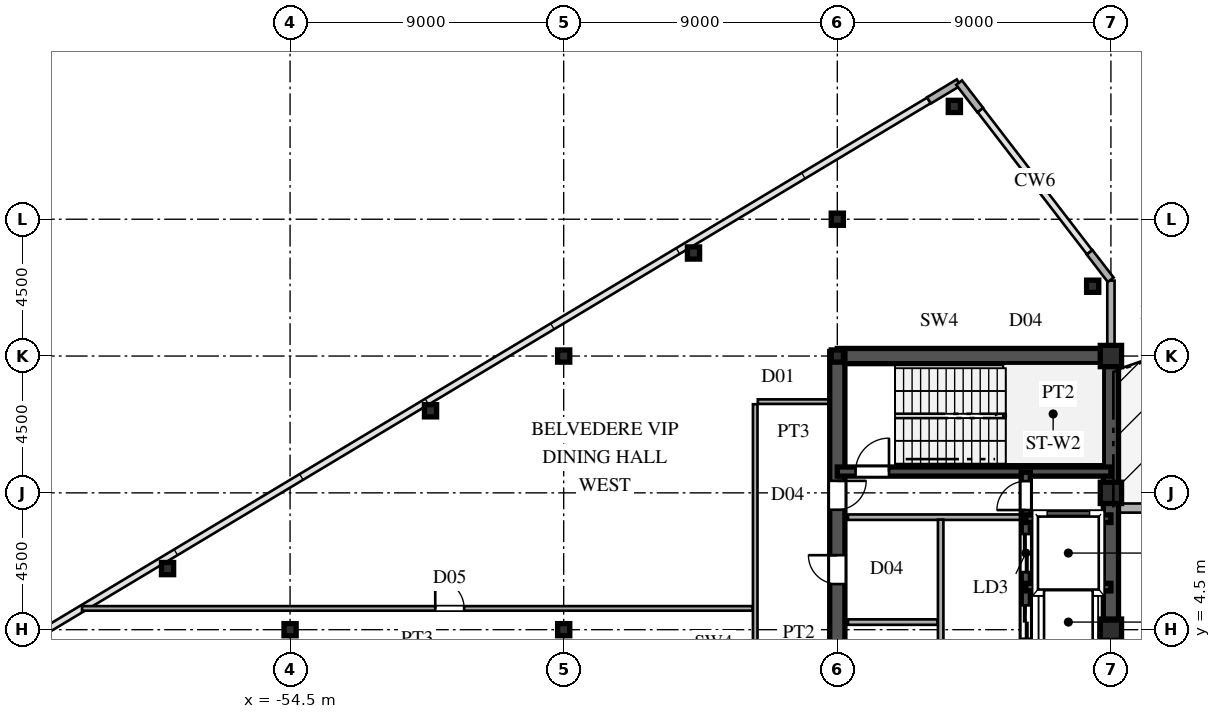
"""IFC4 building model, lengths in metres.
Left out: names, types, materials, properties, quantities, classifications, styles, units other than length and angle.
Written with IfcOpenShell. Run it as: python <this file> out.ifc"""

import sys

from ifc_helpers import new_model, si_unit, direction, frame, frame_2d, origin, origin_2d, place, context, subcontext, project, spatial, rectangle, hollow_rectangle, i_section, extrude, source, transform, mapped, element, fill, save


model = new_model("IFC4")
c1 = context("Model", 3, precision=1e-05, world=origin(), true_north=direction((0.0, 1.0)))
c2 = subcontext(c1, "Body", "Model", "MODEL_VIEW")
j1 = project(units=[si_unit("LENGTHUNIT", "METRE"), si_unit("PLANEANGLEUNIT", "RADIAN")], contexts=[c1])
p1 = place(None, origin())
s1 = spatial("IfcSite", under=j1, at=p1, CompositionType="ELEMENT")
p2 = place(p1, origin())
s2 = spatial("IfcBuilding", under=s1, at=p2, CompositionType="ELEMENT")
p3 = place(p2, frame((0.0, 0.0, 274.2)))
s3 = spatial("IfcBuildingStorey", under=s2, at=p3, CompositionType="ELEMENT", Elevation=274.2)
m1 = source(origin(), c2, "Body", "SweptSolid", [
    extrude(hollow_rectangle(XDim=0.7, YDim=0.7, WallThickness=0.03, at=origin_2d()), origin(), (0.0, 0.0, 1.0), 4.8),
])
for number, where, z_axis, x_axis in (
    (1, (-27.5, 4.5, 0.0), (0.0, 0.0, 1.0), (1.0, 0.0, 0.0)),
    (2, (-27.5, 9.0, 0.0), (0.0, 0.0, 1.0), (1.0, 0.0, 0.0)),
    (3, (-27.5, 13.5, 0.0), (0.0, 0.0, 1.0), (1.0, 0.0, 0.0)),
):
    element("IfcColumn", number, at=place(p3, frame(where, z_axis=z_axis, x_axis=x_axis)), inside=s3, PredefinedType="COLUMN", context=c2, shape_type="MappedRepresentation", body=[
        mapped(m1, transform((0.0, 0.0, 0.0), scale=1.0)),
    ])
m2 = source(origin(), c2, "Body", "SweptSolid", [
    extrude(i_section(OverallWidth=0.4, OverallDepth=0.4, WebThickness=0.013, FlangeThickness=0.021, at=origin_2d()), origin(), (0.0, 0.0, 1.0), 4.8),
])
for number, where, z_axis, x_axis in (
    (4, (-36.5, 13.5, 0.0), (0.0, 0.0, 1.0), (1.0, 0.0, 0.0)),
    (5, (-36.5, 18.0, 0.0), (0.0, 0.0, 1.0), (1.0, 0.0, 0.0)),
    (6, (-45.5, 4.5, 0.0), (0.0, 0.0, 1.0), (1.0, 0.0, 0.0)),
    (7, (-45.5, 13.5, 0.0), (0.0, 0.0, 1.0), (1.0, 0.0, 0.0)),
    (8, (-54.5, 4.5, 0.0), (0.0, 0.0, 1.0), (1.0, 0.0, 0.0)),
):
    element("IfcColumn", number, at=place(p3, frame(where, z_axis=z_axis, x_axis=x_axis)), inside=s3, PredefinedType="COLUMN", context=c2, shape_type="MappedRepresentation", body=[
        mapped(m2, transform((0.0, 0.0, 0.0), scale=1.0)),
    ])
m3 = source(origin(), c2, "Body", "SweptSolid", [
    extrude(hollow_rectangle(XDim=0.4, YDim=0.4, WallThickness=0.016, at=origin_2d()), origin(), (0.0, 0.0, 1.0), 4.8),
])
for number, where, z_axis, x_axis in (
    (9, (-28.1, 15.796, 0.0), (0.0, 0.0, 1.0), (1.0, 0.0, 0.0)),
    (10, (-32.65, 21.71, 0.0), (0.0, 0.0, 1.0), (1.0, 0.0, 0.0)),
    (11, (-41.23, 16.889, 0.0), (0.0, 0.0, 1.0), (1.0, 0.0, 0.0)),
    (12, (-49.88, 11.699, 0.0), (0.0, 0.0, 1.0), (1.0, 0.0, 0.0)),
    (13, (-58.53, 6.509, 0.0), (0.0, 0.0, 1.0), (1.0, 0.0, 0.0)),
):
    element("IfcColumn", number, at=place(p3, frame(where, z_axis=z_axis, x_axis=x_axis)), inside=s3, PredefinedType="COLUMN", context=c2, shape_type="MappedRepresentation", body=[
        mapped(m3, transform((0.0, 0.0, 0.0), scale=1.0)),
    ])
p4 = place(p3, frame((-27.5, 13.755, 0.0), z_axis=(0.0, 0.0, 1.0), x_axis=(0.0, 1.0, 0.0)))
e14 = element("IfcWall", 14, at=p4, inside=s3, PredefinedType="SOLIDWALL", context=c2, shape_type="SweptSolid", body=[
    extrude(rectangle(XDim=0.62, YDim=0.24, at=frame_2d((0.31, 0.0))), origin(), (0.0, 0.0, 1.0), 4.02),
])
p5 = place(p3, frame((-27.5, 14.375, 0.0), z_axis=(0.0, 0.0, 1.0), x_axis=(0.0, 1.0, 0.0)))
e15 = element("IfcWall", 15, at=p5, inside=s3, PredefinedType="SOLIDWALL", context=c2, shape_type="SweptSolid", body=[
    extrude(rectangle(XDim=1.605, YDim=0.24, at=frame_2d((0.803, 0.0))), origin(), (0.0, 0.0, 1.0), 4.52),
])
for number, where, z_axis, x_axis in (
    (16, (-27.506, 16.008, 0.0), (0.0, 0.0, 1.0), (-0.61, 0.793, 0.0)),
    (17, (-31.799, 21.588, 0.0), (0.0, 0.0, 1.0), (-0.61, 0.793, 0.0)),
    (18, (-32.509, 22.495, 0.0), (0.0, 0.0, 1.0), (-0.857, -0.515, 0.0)),
):
    element("IfcWall", number, at=place(p3, frame(where, z_axis=z_axis, x_axis=x_axis)), inside=s3, PredefinedType="SOLIDWALL", context=c2, shape_type="SweptSolid", body=[
        extrude(rectangle(XDim=1.14, YDim=0.24, at=frame_2d((0.57, 0.0))), origin(), (0.0, 0.0, 1.0), 4.52),
    ])
p6 = place(p3, frame((-27.45, 8.5, 0.0), z_axis=(0.0, 0.0, 1.0), x_axis=(1.0, 0.0, 0.0)))
e19 = element("IfcWall", 19, at=p6, inside=s3, PredefinedType="SOLIDWALL", context=c2, shape_type="SweptSolid", body=[
    extrude(rectangle(XDim=54.9, YDim=0.3, at=frame_2d((27.45, 0.0))), origin(), (0.0, 0.0, 1.0), 4.52),
])
p7 = place(p6, frame((12.95, 0.0, 0.0)))
e20 = element("IfcOpeningElement", 20, at=p7, cuts=e19, PredefinedType="OPENING", context=c2, shape_type="SweptSolid", body=[
    extrude(rectangle(XDim=1.9, YDim=2.4, at=frame_2d((0.95, 1.2))), frame((0.0, 0.16, 0.0), z_axis=(0.0, -1.0, 0.0), x_axis=(1.0, 0.0, 0.0)), (0.0, 0.0, 1.0), 0.32),
])
p8 = place(p6, frame((23.95, 0.0, 0.0)))
e21 = element("IfcOpeningElement", 21, at=p8, cuts=e19, PredefinedType="OPENING", context=c2, shape_type="SweptSolid", body=[
    extrude(rectangle(XDim=1.9, YDim=2.4, at=frame_2d((0.95, 1.2))), frame((0.0, 0.16, 0.0), z_axis=(0.0, -1.0, 0.0), x_axis=(1.0, 0.0, 0.0)), (0.0, 0.0, 1.0), 0.32),
])
p9 = place(p6, frame((6.95, 0.0, 0.8)))
e22 = element("IfcOpeningElement", 22, at=p9, cuts=e19, PredefinedType="OPENING", context=c2, shape_type="SweptSolid", body=[
    extrude(rectangle(XDim=2.8, YDim=2.1, at=frame_2d((1.4, 1.05))), frame((0.0, 0.16, 0.0), z_axis=(0.0, -1.0, 0.0), x_axis=(1.0, 0.0, 0.0)), (0.0, 0.0, 1.0), 0.32),
])
p10 = place(p6, frame((17.95, 0.0, 0.8)))
e23 = element("IfcOpeningElement", 23, at=p10, cuts=e19, PredefinedType="OPENING", context=c2, shape_type="SweptSolid", body=[
    extrude(rectangle(XDim=2.8, YDim=2.1, at=frame_2d((1.4, 1.05))), frame((0.0, 0.16, 0.0), z_axis=(0.0, -1.0, 0.0), x_axis=(1.0, 0.0, 0.0)), (0.0, 0.0, 1.0), 0.32),
])
p11 = place(p6, frame((28.95, 0.0, 0.8)))
e24 = element("IfcOpeningElement", 24, at=p11, cuts=e19, PredefinedType="OPENING", context=c2, shape_type="SweptSolid", body=[
    extrude(rectangle(XDim=2.8, YDim=2.1, at=frame_2d((1.4, 1.05))), frame((0.0, 0.16, 0.0), z_axis=(0.0, -1.0, 0.0), x_axis=(1.0, 0.0, 0.0)), (0.0, 0.0, 1.0), 0.32),
])
p12 = place(p3, frame((-27.5, 1.3, 0.0), z_axis=(0.0, 0.0, 1.0), x_axis=(0.0, 1.0, 0.0)))
e25 = element("IfcWall", 25, at=p12, inside=s3, PredefinedType="SHEAR", context=c2, shape_type="SweptSolid", body=[
    extrude(rectangle(XDim=12.2, YDim=0.5, at=frame_2d((6.1, 0.0))), origin(), (0.0, 0.0, 1.0), 4.52),
])
p13 = place(p3, frame((-36.5, 13.5, 0.0), z_axis=(0.0, 0.0, 1.0), x_axis=(1.0, 0.0, 0.0)))
e26 = element("IfcWall", 26, at=p13, inside=s3, PredefinedType="SHEAR", context=c2, shape_type="SweptSolid", body=[
    extrude(rectangle(XDim=9.0, YDim=0.5, at=frame_2d((4.5, 0.0))), origin(), (0.0, 0.0, 1.0), 4.52),
])
p14 = place(p3, frame((-36.5, 8.2, 0.0), z_axis=(0.0, 0.0, 1.0), x_axis=(0.0, 1.0, 0.0)))
e27 = element("IfcWall", 27, at=p14, inside=s3, PredefinedType="SHEAR", context=c2, shape_type="SweptSolid", body=[
    extrude(rectangle(XDim=5.45, YDim=0.5, at=frame_2d((2.725, 0.0))), origin(), (0.0, 0.0, 1.0), 4.52),
])
p15 = place(p14, frame((0.245, 0.0, 0.0)))
e28 = element("IfcOpeningElement", 28, at=p15, cuts=e27, PredefinedType="OPENING", context=c2, shape_type="SweptSolid", body=[
    extrude(rectangle(XDim=0.95, YDim=2.15, at=frame_2d((0.475, 1.075))), frame((0.0, 0.26, 0.0), z_axis=(0.0, -1.0, 0.0), x_axis=(1.0, 0.0, 0.0)), (0.0, 0.0, 1.0), 0.52),
])
p16 = place(p3, frame((-36.5, 1.3, 0.0), z_axis=(0.0, 0.0, 1.0), x_axis=(0.0, 1.0, 0.0)))
e29 = element("IfcWall", 29, at=p16, inside=s3, PredefinedType="SHEAR", context=c2, shape_type="SweptSolid", body=[
    extrude(rectangle(XDim=3.45, YDim=0.5, at=frame_2d((1.725, 0.0))), origin(), (0.0, 0.0, 1.0), 4.52),
])
p17 = place(p16, frame((1.25, 0.0, 0.0)))
e30 = element("IfcOpeningElement", 30, at=p17, cuts=e29, PredefinedType="OPENING", context=c2, shape_type="SweptSolid", body=[
    extrude(rectangle(XDim=0.95, YDim=2.15, at=frame_2d((0.475, 1.075))), frame((0.0, 0.26, 0.0), z_axis=(0.0, -1.0, 0.0), x_axis=(1.0, 0.0, 0.0)), (0.0, 0.0, 1.0), 0.52),
])
p18 = place(p3, frame((-36.5, 4.75, 0.0), z_axis=(0.0, 0.0, 1.0), x_axis=(0.0, 1.0, 0.0)))
e31 = element("IfcWall", 31, at=p18, inside=s3, PredefinedType="SHEAR", context=c2, shape_type="SweptSolid", body=[
    extrude(rectangle(XDim=3.45, YDim=0.5, at=frame_2d((1.725, 0.0))), origin(), (0.0, 0.0, 1.0), 4.52),
])
p19 = place(p18, frame((1.25, 0.0, 0.0)))
e32 = element("IfcOpeningElement", 32, at=p19, cuts=e31, PredefinedType="OPENING", context=c2, shape_type="SweptSolid", body=[
    extrude(rectangle(XDim=0.95, YDim=2.15, at=frame_2d((0.475, 1.075))), frame((0.0, 0.26, 0.0), z_axis=(0.0, -1.0, 0.0), x_axis=(1.0, 0.0, 0.0)), (0.0, 0.0, 1.0), 0.52),
])
p20 = place(p3, frame((-36.5, 9.7, 0.0), z_axis=(0.0, 0.0, 1.0), x_axis=(1.0, 0.0, 0.0)))
e33 = element("IfcWall", 33, at=p20, inside=s3, PredefinedType="SHEAR", context=c2, shape_type="SweptSolid", body=[
    extrude(rectangle(XDim=9.0, YDim=0.3, at=frame_2d((4.5, 0.0))), origin(), (0.0, 0.0, 1.0), 4.52),
])
p21 = place(p20, frame((0.6, 0.0, 0.0)))
e34 = element("IfcOpeningElement", 34, at=p21, cuts=e33, PredefinedType="OPENING", context=c2, shape_type="SweptSolid", body=[
    extrude(rectangle(XDim=1.1, YDim=2.2, at=frame_2d((0.55, 1.1))), frame((0.0, 0.16, 0.0), z_axis=(0.0, -1.0, 0.0), x_axis=(1.0, 0.0, 0.0)), (0.0, 0.0, 1.0), 0.32),
])
for number, where, z_axis, x_axis in (
    (35, (-30.3, 5.9, 0.0), (0.0, 0.0, 1.0), (1.0, 0.0, 0.0)),
    (36, (-30.3, 8.15, 0.0), (0.0, 0.0, 1.0), (1.0, 0.0, 0.0)),
):
    element("IfcWall", number, at=place(p3, frame(where, z_axis=z_axis, x_axis=x_axis)), inside=s3, PredefinedType="SHEAR", context=c2, shape_type="SweptSolid", body=[
        extrude(rectangle(XDim=2.8, YDim=0.25, at=frame_2d((1.4, 0.0))), origin(), (0.0, 0.0, 1.0), 4.52),
    ])
p22 = place(p3, frame((-30.3, 3.6, 0.0), z_axis=(0.0, 0.0, 1.0), x_axis=(0.0, 1.0, 0.0)))
e37 = element("IfcWall", 37, at=p22, inside=s3, PredefinedType="SHEAR", context=c2, shape_type="SweptSolid", body=[
    extrude(rectangle(XDim=2.3, YDim=0.3, at=frame_2d((1.15, 0.0))), origin(), (0.0, 0.0, 1.0), 4.52),
])
p23 = place(p22, frame((0.6, 0.0, 0.0)))
e38 = element("IfcOpeningElement", 38, at=p23, cuts=e37, PredefinedType="OPENING", context=c2, shape_type="SweptSolid", body=[
    extrude(rectangle(XDim=1.1, YDim=2.2, at=frame_2d((0.55, 1.1))), frame((0.0, 0.16, 0.0), z_axis=(0.0, -1.0, 0.0), x_axis=(1.0, 0.0, 0.0)), (0.0, 0.0, 1.0), 0.32),
])
p24 = place(p3, frame((-30.3, 5.9, 0.0), z_axis=(0.0, 0.0, 1.0), x_axis=(0.0, 1.0, 0.0)))
e39 = element("IfcWall", 39, at=p24, inside=s3, PredefinedType="SHEAR", context=c2, shape_type="SweptSolid", body=[
    extrude(rectangle(XDim=2.25, YDim=0.3, at=frame_2d((1.125, 0.0))), origin(), (0.0, 0.0, 1.0), 4.52),
])
p25 = place(p24, frame((0.495, 0.0, 0.0)))
e40 = element("IfcOpeningElement", 40, at=p25, cuts=e39, PredefinedType="OPENING", context=c2, shape_type="SweptSolid", body=[
    extrude(rectangle(XDim=1.25, YDim=2.3, at=frame_2d((0.625, 1.15))), frame((0.0, 0.16, 0.0), z_axis=(0.0, -1.0, 0.0), x_axis=(1.0, 0.0, 0.0)), (0.0, 0.0, 1.0), 0.32),
])
p26 = place(p3, frame((-30.3, 8.15, 0.0), z_axis=(0.0, 0.0, 1.0), x_axis=(0.0, 1.0, 0.0)))
e41 = element("IfcWall", 41, at=p26, inside=s3, PredefinedType="SHEAR", context=c2, shape_type="SweptSolid", body=[
    extrude(rectangle(XDim=1.53, YDim=0.3, at=frame_2d((0.765, 0.0))), origin(), (0.0, 0.0, 1.0), 4.52),
])
p27 = place(p26, frame((0.285, 0.0, 0.0)))
e42 = element("IfcOpeningElement", 42, at=p27, cuts=e41, PredefinedType="OPENING", context=c2, shape_type="SweptSolid", body=[
    extrude(rectangle(XDim=0.95, YDim=2.15, at=frame_2d((0.475, 1.075))), frame((0.0, 0.16, 0.0), z_axis=(0.0, -1.0, 0.0), x_axis=(1.0, 0.0, 0.0)), (0.0, 0.0, 1.0), 0.32),
])
p28 = place(p3, frame((-36.15, 8.2, 0.0), z_axis=(0.0, 0.0, 1.0), x_axis=(1.0, 0.0, 0.0)))
e43 = element("IfcWall", 43, at=p28, inside=s3, PredefinedType="PARTITIONING", context=c2, shape_type="SweptSolid", body=[
    extrude(rectangle(XDim=5.7, YDim=0.18, at=frame_2d((2.85, 0.0))), origin(), (0.0, 0.0, 1.0), 4.52),
])
p29 = place(p3, frame((-33.1, 1.38, 0.0), z_axis=(0.0, 0.0, 1.0), x_axis=(0.0, 1.0, 0.0)))
e44 = element("IfcWall", 44, at=p29, inside=s3, PredefinedType="PARTITIONING", context=c2, shape_type="SweptSolid", body=[
    extrude(rectangle(XDim=6.74, YDim=0.18, at=frame_2d((3.37, 0.0))), origin(), (0.0, 0.0, 1.0), 4.52),
])
p30 = place(p3, frame((-36.15, 4.75, 0.0), z_axis=(0.0, 0.0, 1.0), x_axis=(1.0, 0.0, 0.0)))
e45 = element("IfcWall", 45, at=p30, inside=s3, PredefinedType="PARTITIONING", context=c2, shape_type="SweptSolid", body=[
    extrude(rectangle(XDim=2.95, YDim=0.18, at=frame_2d((1.475, 0.0))), origin(), (0.0, 0.0, 1.0), 4.52),
])
p31 = place(p3, frame((-61.343, 5.2, 0.0), z_axis=(0.0, 0.0, 1.0), x_axis=(1.0, 0.0, 0.0)))
e46 = element("IfcWall", 46, at=p31, inside=s3, PredefinedType="PARTITIONING", context=c2, shape_type="SweptSolid", body=[
    extrude(rectangle(XDim=22.058, YDim=0.15, at=frame_2d((11.029, 0.0))), origin(), (0.0, 0.0, 1.0), 4.52),
])
p32 = place(p31, frame((11.618, 0.0, 0.0)))
e47 = element("IfcOpeningElement", 47, at=p32, cuts=e46, PredefinedType="OPENING", context=c2, shape_type="SweptSolid", body=[
    extrude(rectangle(XDim=0.95, YDim=2.15, at=frame_2d((0.475, 1.075))), frame((0.0, 0.085, 0.0), z_axis=(0.0, -1.0, 0.0), x_axis=(1.0, 0.0, 0.0)), (0.0, 0.0, 1.0), 0.17),
])
p33 = place(p3, frame((-39.115, 12.0, 0.0), z_axis=(0.0, 0.0, 1.0), x_axis=(1.0, 0.0, 0.0)))
e48 = element("IfcWall", 48, at=p33, inside=s3, PredefinedType="PARTITIONING", context=c2, shape_type="SweptSolid", body=[
    extrude(rectangle(XDim=2.36, YDim=0.15, at=frame_2d((1.18, 0.0))), origin(), (0.0, 0.0, 1.0), 4.52),
])
p34 = place(p3, frame((-39.2, -11.915, 0.0), z_axis=(0.0, 0.0, 1.0), x_axis=(0.0, 1.0, 0.0)))
e49 = element("IfcWall", 49, at=p34, inside=s3, PredefinedType="PARTITIONING", context=c2, shape_type="SweptSolid", body=[
    extrude(rectangle(XDim=23.83, YDim=0.15, at=frame_2d((11.915, 0.0))), origin(), (0.0, 0.0, 1.0), 4.52),
])
p35 = place(p34, frame((11.44, 0.0, 0.0)))
e50 = element("IfcOpeningElement", 50, at=p35, cuts=e49, PredefinedType="OPENING", context=c2, shape_type="SweptSolid", body=[
    extrude(rectangle(XDim=0.95, YDim=2.15, at=frame_2d((0.475, 1.075))), frame((0.0, 0.085, 0.0), z_axis=(0.0, -1.0, 0.0), x_axis=(1.0, 0.0, 0.0)), (0.0, 0.0, 1.0), 0.17),
])
m4 = source(origin(), c2, "Body", "SweptSolid", [
    extrude(rectangle(XDim=0.95, YDim=2.15, at=frame_2d((0.475, 1.075))), frame((0.0, 0.025, 0.0), z_axis=(0.0, -1.0, 0.0), x_axis=(1.0, 0.0, 0.0)), (0.0, 0.0, 1.0), 0.05),
])
p36 = place(p15, frame((0.95, 0.0, 0.0), z_axis=(0.0, 0.0, 1.0), x_axis=(-1.0, 0.0, 0.0)))
e51 = element("IfcDoor", 51, at=p36, inside=s3, OperationType="SINGLE_SWING_RIGHT", PredefinedType="DOOR", context=c2, shape_type="MappedRepresentation", body=[
    mapped(m4, transform((0.0, 0.0, 0.0), scale=1.0)),
])
fill(e28, e51)
p37 = place(p19, origin())
e52 = element("IfcDoor", 52, at=p37, inside=s3, OperationType="SINGLE_SWING_RIGHT", PredefinedType="DOOR", context=c2, shape_type="MappedRepresentation", body=[
    mapped(m4, transform((0.0, 0.0, 0.0), scale=1.0)),
])
fill(e32, e52)
m5 = source(origin(), c2, "Body", "SweptSolid", [
    extrude(rectangle(XDim=1.1, YDim=2.2, at=frame_2d((0.55, 1.1))), frame((0.0, 0.025, 0.0), z_axis=(0.0, -1.0, 0.0), x_axis=(1.0, 0.0, 0.0)), (0.0, 0.0, 1.0), 0.05),
])
p38 = place(p21, origin())
e53 = element("IfcDoor", 53, at=p38, inside=s3, OperationType="SINGLE_SWING_RIGHT", PredefinedType="DOOR", context=c2, shape_type="MappedRepresentation", body=[
    mapped(m5, transform((0.0, 0.0, 0.0), scale=1.0)),
])
fill(e34, e53)
m6 = source(origin(), c2, "Body", "SweptSolid", [
    extrude(rectangle(XDim=1.1, YDim=2.2, at=frame_2d((0.55, 1.1))), frame((0.0, 0.025, 0.0), z_axis=(0.0, -1.0, 0.0), x_axis=(1.0, 0.0, 0.0)), (0.0, 0.0, 1.0), 0.05),
])
p39 = place(p23, origin())
e54 = element("IfcDoor", 54, at=p39, inside=s3, OperationType="DOUBLE_DOOR_SLIDING", PredefinedType="DOOR", context=c2, shape_type="MappedRepresentation", body=[
    mapped(m6, transform((0.0, 0.0, 0.0), scale=1.0)),
])
fill(e38, e54)
m7 = source(origin(), c2, "Body", "SweptSolid", [
    extrude(rectangle(XDim=1.25, YDim=2.3, at=frame_2d((0.625, 1.15))), frame((0.0, 0.025, 0.0), z_axis=(0.0, -1.0, 0.0), x_axis=(1.0, 0.0, 0.0)), (0.0, 0.0, 1.0), 0.05),
])
p40 = place(p25, origin())
e55 = element("IfcDoor", 55, at=p40, inside=s3, OperationType="DOUBLE_DOOR_SLIDING", PredefinedType="DOOR", context=c2, shape_type="MappedRepresentation", body=[
    mapped(m7, transform((0.0, 0.0, 0.0), scale=1.0)),
])
fill(e40, e55)
p41 = place(p27, origin())
e56 = element("IfcDoor", 56, at=p41, inside=s3, OperationType="SINGLE_SWING_LEFT", PredefinedType="DOOR", context=c2, shape_type="MappedRepresentation", body=[
    mapped(m4, transform((0.0, 0.0, 0.0), scale=1.0)),
])
fill(e42, e56)
m8 = source(origin(), c2, "Body", "SweptSolid", [
    extrude(rectangle(XDim=0.95, YDim=2.15, at=frame_2d((0.475, 1.075))), frame((0.0, 0.025, 0.0), z_axis=(0.0, -1.0, 0.0), x_axis=(1.0, 0.0, 0.0)), (0.0, 0.0, 1.0), 0.05),
])
p42 = place(p32, origin())
e57 = element("IfcDoor", 57, at=p42, inside=s3, OperationType="SINGLE_SWING_LEFT", PredefinedType="DOOR", context=c2, shape_type="MappedRepresentation", body=[
    mapped(m8, transform((0.0, 0.0, 0.0), scale=1.0)),
])
fill(e47, e57)
save(model, sys.argv[1])
